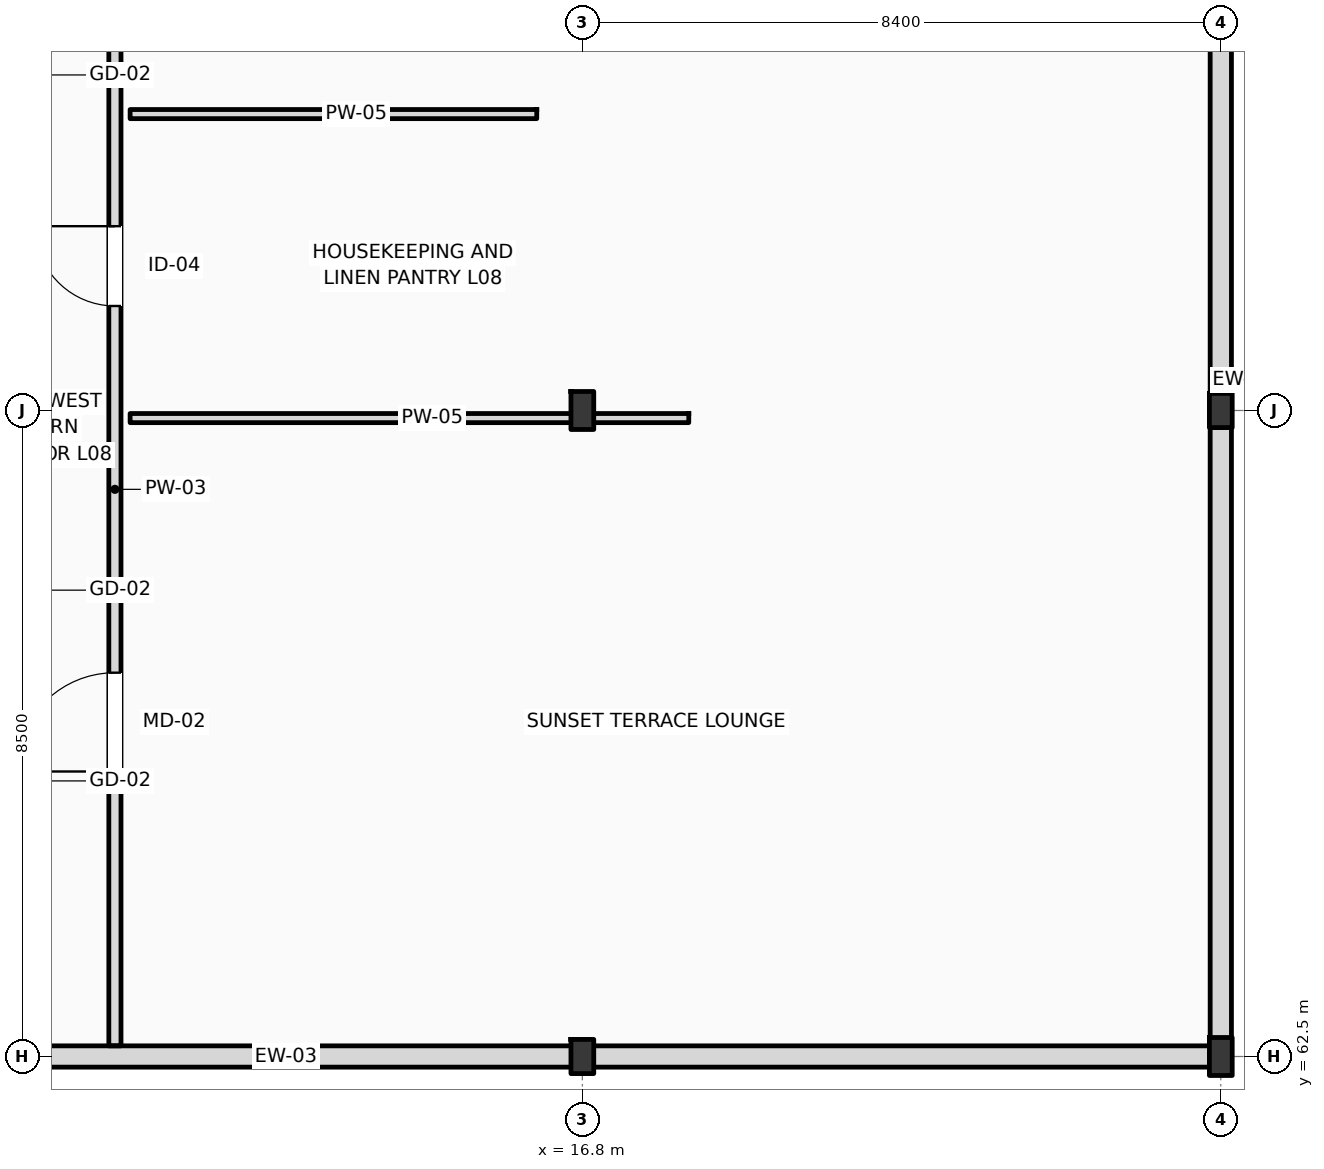
"""IFC4 building model, lengths in metres.
Left out: names, types, materials, properties, quantities, classifications, styles, units other than length and angle.
Written with IfcOpenShell. Run it as: python <this file> out.ifc"""

import sys

from ifc_helpers import new_model, si_unit, direction, frame, frame_2d, origin, origin_2d, place, context, subcontext, project, spatial, rectangle, i_section, extrude, element, fill, save


model = new_model("IFC4")
c1 = context("Model", 3, precision=1e-05, world=origin(), true_north=direction((0.0, 1.0)))
c2 = subcontext(c1, "Body", "Model", "MODEL_VIEW")
j1 = project(units=[si_unit("LENGTHUNIT", "METRE"), si_unit("PLANEANGLEUNIT", "RADIAN")], contexts=[c1])
p1 = place(None, origin())
s1 = spatial("IfcSite", under=j1, at=p1, CompositionType="ELEMENT")
p2 = place(p1, origin())
s2 = spatial("IfcBuilding", under=s1, at=p2, CompositionType="ELEMENT")
p3 = place(p2, frame((0.0, 0.0, 35.4)))
s3 = spatial("IfcBuildingStorey", under=s2, at=p3, CompositionType="ELEMENT", Elevation=35.4)
p4 = place(p3, frame((16.8, 62.5, 0.0), z_axis=(0.0, 0.0, 1.0), x_axis=(1.0, 0.0, 0.0)))
e1 = element("IfcColumn", 1, at=p4, inside=s3, PredefinedType="COLUMN", context=c2, shape_type="SweptSolid", body=[
    extrude(i_section(OverallWidth=0.3, OverallDepth=0.45, WebThickness=0.014, FlangeThickness=0.026, FilletRadius=0.027, at=origin_2d()), origin(), (0.0, 0.0, 1.0), 3.6),
])
for number, where, z_axis, x_axis in (
    (2, (16.8, 71.0, 0.0), (0.0, 0.0, 1.0), (1.0, 0.0, 0.0)),
    (3, (25.2, 62.5, 0.0), (0.0, 0.0, 1.0), (1.0, 0.0, 0.0)),
):
    element("IfcColumn", number, at=place(p3, frame(where, z_axis=z_axis, x_axis=x_axis)), inside=s3, PredefinedType="COLUMN", context=c2, shape_type="SweptSolid", body=[
        extrude(i_section(OverallWidth=0.3, OverallDepth=0.5, WebThickness=0.014, FlangeThickness=0.028, FilletRadius=0.027, at=origin_2d()), origin(), (0.0, 0.0, 1.0), 3.6),
    ])
p5 = place(p3, frame((25.2, 71.0, 0.0), z_axis=(0.0, 0.0, 1.0), x_axis=(1.0, 0.0, 0.0)))
e4 = element("IfcColumn", 4, at=p5, inside=s3, PredefinedType="COLUMN", context=c2, shape_type="SweptSolid", body=[
    extrude(i_section(OverallWidth=0.3, OverallDepth=0.45, WebThickness=0.014, FlangeThickness=0.026, FilletRadius=0.027, at=origin_2d()), origin(), (0.0, 0.0, 1.0), 3.6),
])
p6 = place(p3, frame((0.0, 62.5, 0.0), z_axis=(0.0, 0.0, 1.0), x_axis=(1.0, 0.0, 0.0)))
e5 = element("IfcWall", 5, at=p6, inside=s3, PredefinedType="STANDARD", context=c2, shape_type="SweptSolid", body=[
    extrude(rectangle(XDim=25.2, YDim=0.28, at=frame_2d((12.6, 0.0))), origin(), (0.0, 0.0, 1.0), 2.82),
])
p7 = place(p3, frame((25.2, 62.5, 0.0), z_axis=(0.0, 0.0, 1.0), x_axis=(0.0, 1.0, 0.0)))
e6 = element("IfcWall", 6, at=p7, inside=s3, PredefinedType="STANDARD", context=c2, shape_type="SweptSolid", body=[
    extrude(rectangle(XDim=17.0, YDim=0.28, at=frame_2d((8.5, 0.0))), origin(), (0.0, 0.0, 1.0), 3.01),
])
p8 = place(p3, frame((10.65, 62.64, 0.0), z_axis=(0.0, 0.0, 1.0), x_axis=(0.0, 1.0, 0.0)))
e7 = element("IfcWall", 7, at=p8, inside=s3, PredefinedType="PARTITIONING", context=c2, shape_type="SweptSolid", body=[
    extrude(rectangle(XDim=16.31, YDim=0.16, at=frame_2d((8.155, 0.0))), origin(), (0.0, 0.0, 1.0), 3.38),
])
p9 = place(p8, frame((3.61, 0.0, 0.0)))
e8 = element("IfcOpeningElement", 8, at=p9, cuts=e7, PredefinedType="OPENING", context=c2, shape_type="SweptSolid", body=[
    extrude(rectangle(XDim=1.3, YDim=2.2, at=frame_2d((0.65, 1.1))), frame((0.0, 0.09, 0.0), z_axis=(0.0, -1.0, 0.0), x_axis=(1.0, 0.0, 0.0)), (0.0, 0.0, 1.0), 0.18),
])
p10 = place(p8, frame((9.735, 0.0, 0.0)))
e9 = element("IfcOpeningElement", 9, at=p10, cuts=e7, PredefinedType="OPENING", context=c2, shape_type="SweptSolid", body=[
    extrude(rectangle(XDim=1.05, YDim=2.12, at=frame_2d((0.525, 1.06))), frame((0.0, 0.09, 0.0), z_axis=(0.0, -1.0, 0.0), x_axis=(1.0, 0.0, 0.0)), (0.0, 0.0, 1.0), 0.18),
])
p11 = place(p8, frame((13.49, 0.0, 0.0)))
e10 = element("IfcOpeningElement", 10, at=p11, cuts=e7, PredefinedType="OPENING", context=c2, shape_type="SweptSolid", body=[
    extrude(rectangle(XDim=0.94, YDim=2.15, at=frame_2d((0.47, 1.075))), frame((0.0, 0.09, 0.0), z_axis=(0.0, -1.0, 0.0), x_axis=(1.0, 0.0, 0.0)), (0.0, 0.0, 1.0), 0.18),
])
p12 = place(p3, frame((10.85, 70.9, 0.0), z_axis=(0.0, 0.0, 1.0), x_axis=(1.0, 0.0, 0.0)))
e11 = element("IfcWall", 11, at=p12, inside=s3, PredefinedType="PARTITIONING", context=c2, shape_type="SweptSolid", body=[
    extrude(rectangle(XDim=7.35, YDim=0.12, at=frame_2d((3.675, 0.0))), origin(), (0.0, 0.0, 1.0), 2.82),
])
p13 = place(p3, frame((10.85, 74.9, 0.0), z_axis=(0.0, 0.0, 1.0), x_axis=(1.0, 0.0, 0.0)))
e12 = element("IfcWall", 12, at=p13, inside=s3, PredefinedType="PARTITIONING", context=c2, shape_type="SweptSolid", body=[
    extrude(rectangle(XDim=5.35, YDim=0.12, at=frame_2d((2.675, 0.0))), origin(), (0.0, 0.0, 1.0), 3.38),
])
p14 = place(p9, origin())
e13 = element("IfcDoor", 13, at=p14, inside=s3, OperationType="SINGLE_SWING_LEFT", PredefinedType="DOOR", context=c2, shape_type="SweptSolid", body=[
    extrude(rectangle(XDim=1.3, YDim=2.2, at=frame_2d((0.65, 1.1))), frame((0.0, 0.025, 0.0), z_axis=(0.0, -1.0, 0.0), x_axis=(1.0, 0.0, 0.0)), (0.0, 0.0, 1.0), 0.05),
])
fill(e8, e13)
p15 = place(p10, origin())
e14 = element("IfcDoor", 14, at=p15, inside=s3, OperationType="SINGLE_SWING_RIGHT", PredefinedType="DOOR", context=c2, shape_type="SweptSolid", body=[
    extrude(rectangle(XDim=1.05, YDim=2.12, at=frame_2d((0.525, 1.06))), frame((0.0, 0.025, 0.0), z_axis=(0.0, -1.0, 0.0), x_axis=(1.0, 0.0, 0.0)), (0.0, 0.0, 1.0), 0.05),
])
fill(e9, e14)
save(model, sys.argv[1])
